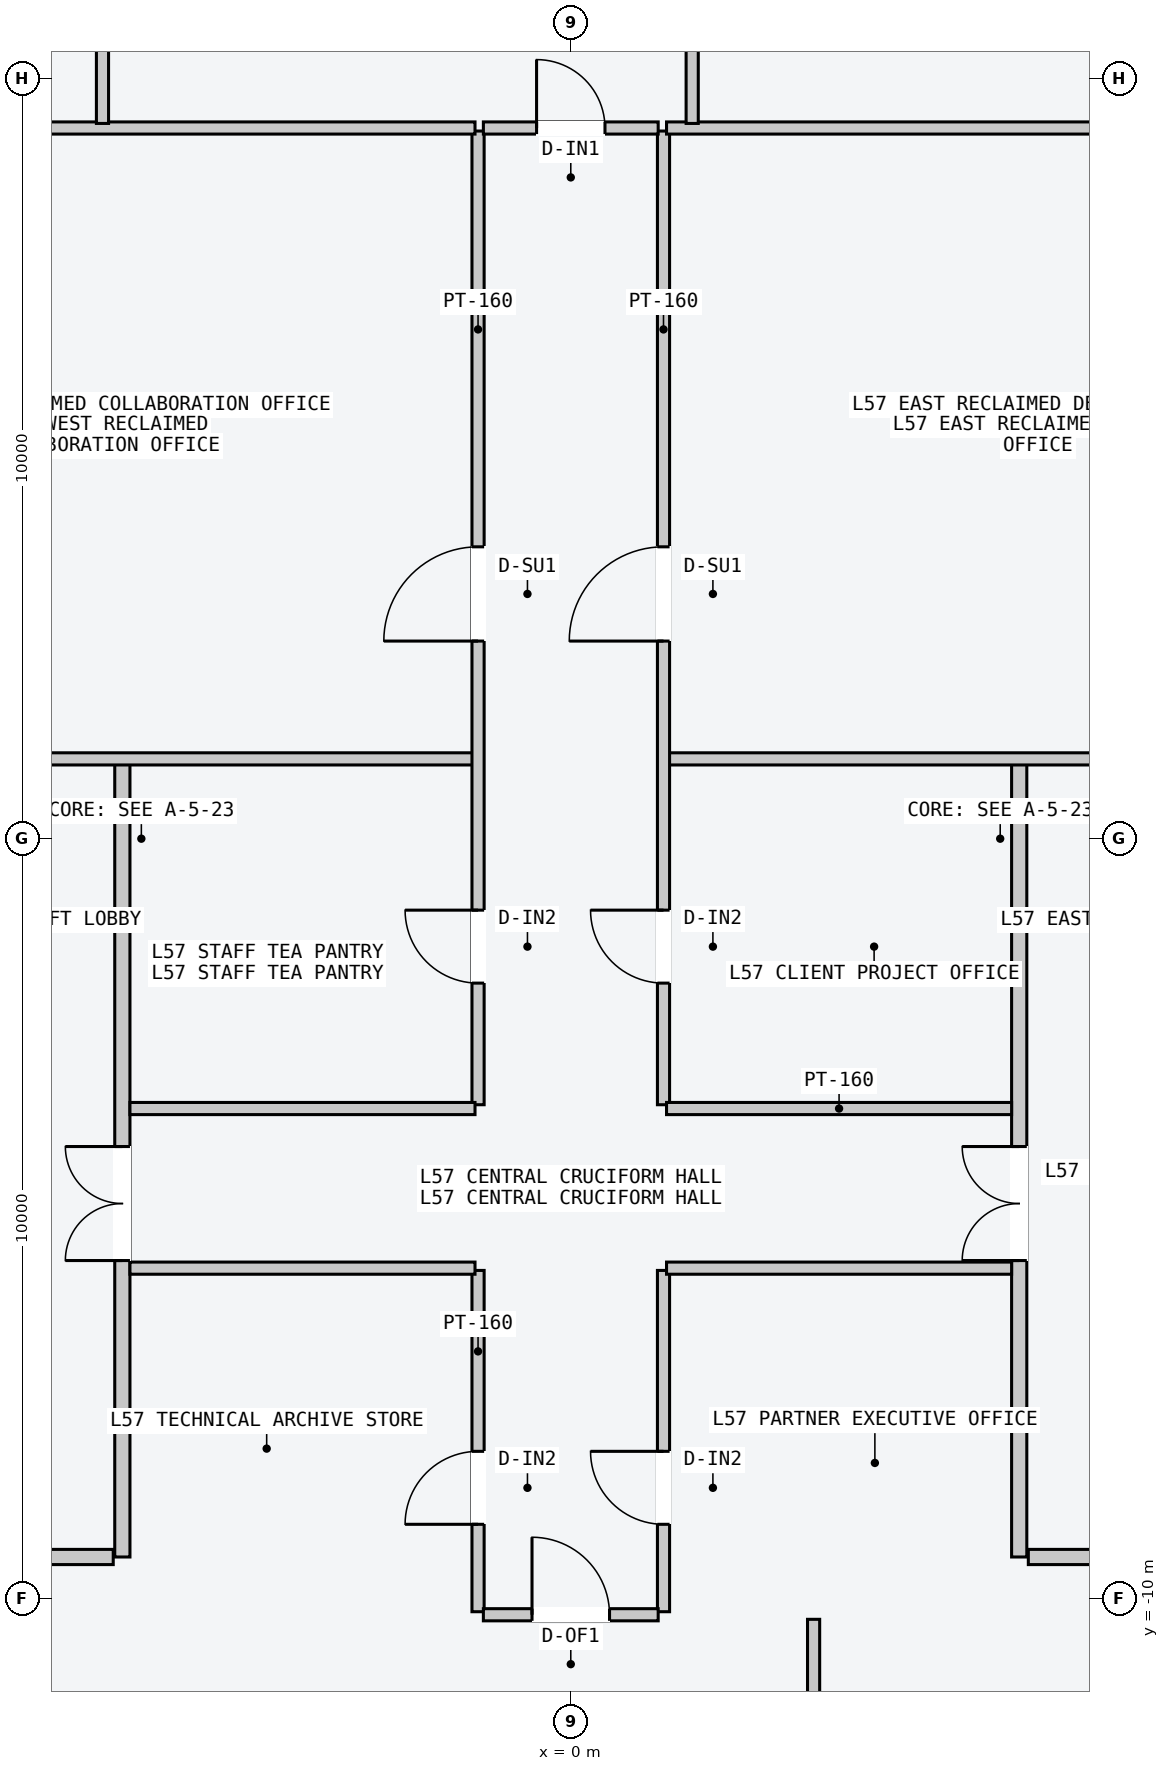
"""IFC4 building model, lengths in metres.
Left out: names, types, materials, properties, quantities, classifications, styles, units other than length and angle.
Written with IfcOpenShell. Run it as: python <this file> out.ifc"""

import sys

from ifc_helpers import new_model, si_unit, direction, frame, frame_2d, origin, place, context, subcontext, project, spatial, rectangle, extrude, element, fill, save


model = new_model("IFC4")
c1 = context("Model", 3, precision=1e-05, world=origin(), true_north=direction((0.0, 1.0)))
c2 = subcontext(c1, "Body", "Model", "MODEL_VIEW")
j1 = project(units=[si_unit("LENGTHUNIT", "METRE"), si_unit("PLANEANGLEUNIT", "RADIAN")], contexts=[c1])
p1 = place(None, origin())
s1 = spatial("IfcSite", under=j1, at=p1, CompositionType="ELEMENT")
p2 = place(p1, origin())
s2 = spatial("IfcBuilding", under=s1, at=p2, CompositionType="ELEMENT")
p3 = place(p2, frame((0.0, 0.0, 218.4)))
s3 = spatial("IfcBuildingStorey", under=s2, at=p3, CompositionType="ELEMENT", Elevation=218.4)
p4 = place(p3, frame((-5.9, -9.45, 0.0), z_axis=(0.0, 0.0, 1.0), x_axis=(0.0, 1.0, 0.0)))
e1 = element("IfcWall", 1, at=p4, inside=s3, PredefinedType="PARTITIONING", context=c2, shape_type="SweptSolid", body=[
    extrude(rectangle(XDim=10.5, YDim=0.2, at=frame_2d((5.25, 0.0))), origin(), (0.0, 0.0, 1.0), 3.4),
])
p5 = place(p4, frame((3.9, 0.0, 0.0)))
e2 = element("IfcOpeningElement", 2, at=p5, cuts=e1, PredefinedType="OPENING", context=c2, shape_type="SweptSolid", body=[
    extrude(rectangle(XDim=1.5, YDim=2.2, at=frame_2d((0.75, 1.1))), frame((0.0, 0.11, 0.0), z_axis=(0.0, -1.0, 0.0), x_axis=(1.0, 0.0, 0.0)), (0.0, 0.0, 1.0), 0.22),
])
p6 = place(p3, frame((-6.02, -9.45, 0.0), z_axis=(0.0, 0.0, 1.0), x_axis=(-1.0, 0.0, 0.0)))
e3 = element("IfcWall", 3, at=p6, inside=s3, PredefinedType="PARTITIONING", context=c2, shape_type="SweptSolid", body=[
    extrude(rectangle(XDim=1.8, YDim=0.2, at=frame_2d((0.9, 0.0))), origin(), (0.0, 0.0, 1.0), 3.4),
])
p7 = place(p3, frame((5.9, -9.45, 0.0), z_axis=(0.0, 0.0, 1.0), x_axis=(0.0, 1.0, 0.0)))
e4 = element("IfcWall", 4, at=p7, inside=s3, PredefinedType="PARTITIONING", context=c2, shape_type="SweptSolid", body=[
    extrude(rectangle(XDim=10.5, YDim=0.2, at=frame_2d((5.25, 0.0))), origin(), (0.0, 0.0, 1.0), 3.4),
])
p8 = place(p7, frame((3.9, 0.0, 0.0)))
e5 = element("IfcOpeningElement", 5, at=p8, cuts=e4, PredefinedType="OPENING", context=c2, shape_type="SweptSolid", body=[
    extrude(rectangle(XDim=1.5, YDim=2.2, at=frame_2d((0.75, 1.1))), frame((0.0, 0.11, 0.0), z_axis=(0.0, -1.0, 0.0), x_axis=(1.0, 0.0, 0.0)), (0.0, 0.0, 1.0), 0.22),
])
p9 = place(p3, frame((6.02, -9.45, 0.0), z_axis=(0.0, 0.0, 1.0), x_axis=(1.0, 0.0, 0.0)))
e6 = element("IfcWall", 6, at=p9, inside=s3, PredefinedType="PARTITIONING", context=c2, shape_type="SweptSolid", body=[
    extrude(rectangle(XDim=1.8, YDim=0.2, at=frame_2d((0.9, 0.0))), origin(), (0.0, 0.0, 1.0), 3.4),
])
p10 = place(p3, frame((-10.05, 1.05, 0.0), z_axis=(0.0, 0.0, 1.0), x_axis=(1.0, 0.0, 0.0)))
e7 = element("IfcWall", 7, at=p10, inside=s3, PredefinedType="PARTITIONING", context=c2, shape_type="SweptSolid", body=[
    extrude(rectangle(XDim=8.79, YDim=0.16, at=frame_2d((4.395, 0.0))), origin(), (0.0, 0.0, 1.0), 3.4),
])
p11 = place(p3, frame((-1.22, -3.5, 0.0), z_axis=(0.0, 0.0, 1.0), x_axis=(0.0, 1.0, 0.0)))
e8 = element("IfcWall", 8, at=p11, inside=s3, PredefinedType="PARTITIONING", context=c2, shape_type="SweptSolid", body=[
    extrude(rectangle(XDim=12.81, YDim=0.16, at=frame_2d((6.405, 0.0))), origin(), (0.0, 0.0, 1.0), 3.4),
])
p12 = place(p11, frame((6.1, 0.0, 0.0)))
e9 = element("IfcOpeningElement", 9, at=p12, cuts=e8, PredefinedType="OPENING", context=c2, shape_type="SweptSolid", body=[
    extrude(rectangle(XDim=1.24, YDim=2.24, at=frame_2d((0.62, 1.12))), frame((0.0, 0.09, 0.0), z_axis=(0.0, -1.0, 0.0), x_axis=(1.0, 0.0, 0.0)), (0.0, 0.0, 1.0), 0.18),
])
p13 = place(p11, frame((1.6, 0.0, 0.0)))
e10 = element("IfcOpeningElement", 10, at=p13, cuts=e8, PredefinedType="OPENING", context=c2, shape_type="SweptSolid", body=[
    extrude(rectangle(XDim=0.96, YDim=2.18, at=frame_2d((0.48, 1.09))), frame((0.0, 0.09, 0.0), z_axis=(0.0, -1.0, 0.0), x_axis=(1.0, 0.0, 0.0)), (0.0, 0.0, 1.0), 0.18),
])
p14 = place(p3, frame((-7.5, 9.35, 0.0), z_axis=(0.0, 0.0, 1.0), x_axis=(1.0, 0.0, 0.0)))
e11 = element("IfcWall", 11, at=p14, inside=s3, PredefinedType="PARTITIONING", context=c2, shape_type="SweptSolid", body=[
    extrude(rectangle(XDim=6.24, YDim=0.16, at=frame_2d((3.12, 0.0))), origin(), (0.0, 0.0, 1.0), 3.4),
])
p15 = place(p3, frame((-5.8, -3.55, 0.0), z_axis=(0.0, 0.0, 1.0), x_axis=(1.0, 0.0, 0.0)))
e12 = element("IfcWall", 12, at=p15, inside=s3, PredefinedType="PARTITIONING", context=c2, shape_type="SweptSolid", body=[
    extrude(rectangle(XDim=4.54, YDim=0.16, at=frame_2d((2.27, 0.0))), origin(), (0.0, 0.0, 1.0), 3.4),
])
p16 = place(p3, frame((1.26, 1.05, 0.0), z_axis=(0.0, 0.0, 1.0), x_axis=(1.0, 0.0, 0.0)))
e13 = element("IfcWall", 13, at=p16, inside=s3, PredefinedType="PARTITIONING", context=c2, shape_type="SweptSolid", body=[
    extrude(rectangle(XDim=8.8, YDim=0.16, at=frame_2d((4.4, 0.0))), origin(), (0.0, 0.0, 1.0), 3.4),
])
p17 = place(p3, frame((1.22, -3.5, 0.0), z_axis=(0.0, 0.0, 1.0), x_axis=(0.0, 1.0, 0.0)))
e14 = element("IfcWall", 14, at=p17, inside=s3, PredefinedType="PARTITIONING", context=c2, shape_type="SweptSolid", body=[
    extrude(rectangle(XDim=12.81, YDim=0.16, at=frame_2d((6.405, 0.0))), origin(), (0.0, 0.0, 1.0), 3.4),
])
p18 = place(p17, frame((6.1, 0.0, 0.0)))
e15 = element("IfcOpeningElement", 15, at=p18, cuts=e14, PredefinedType="OPENING", context=c2, shape_type="SweptSolid", body=[
    extrude(rectangle(XDim=1.24, YDim=2.24, at=frame_2d((0.62, 1.12))), frame((0.0, 0.09, 0.0), z_axis=(0.0, -1.0, 0.0), x_axis=(1.0, 0.0, 0.0)), (0.0, 0.0, 1.0), 0.18),
])
p19 = place(p17, frame((1.6, 0.0, 0.0)))
e16 = element("IfcOpeningElement", 16, at=p19, cuts=e14, PredefinedType="OPENING", context=c2, shape_type="SweptSolid", body=[
    extrude(rectangle(XDim=0.96, YDim=2.18, at=frame_2d((0.48, 1.09))), frame((0.0, 0.09, 0.0), z_axis=(0.0, -1.0, 0.0), x_axis=(1.0, 0.0, 0.0)), (0.0, 0.0, 1.0), 0.18),
])
p20 = place(p3, frame((1.26, 9.35, 0.0), z_axis=(0.0, 0.0, 1.0), x_axis=(1.0, 0.0, 0.0)))
e17 = element("IfcWall", 17, at=p20, inside=s3, PredefinedType="PARTITIONING", context=c2, shape_type="SweptSolid", body=[
    extrude(rectangle(XDim=6.24, YDim=0.16, at=frame_2d((3.12, 0.0))), origin(), (0.0, 0.0, 1.0), 3.4),
])
p21 = place(p3, frame((1.26, -3.55, 0.0), z_axis=(0.0, 0.0, 1.0), x_axis=(1.0, 0.0, 0.0)))
e18 = element("IfcWall", 18, at=p21, inside=s3, PredefinedType="PARTITIONING", context=c2, shape_type="SweptSolid", body=[
    extrude(rectangle(XDim=4.54, YDim=0.16, at=frame_2d((2.27, 0.0))), origin(), (0.0, 0.0, 1.0), 3.4),
])
p22 = place(p3, frame((-1.22, -10.17, 0.0), z_axis=(0.0, 0.0, 1.0), x_axis=(0.0, 1.0, 0.0)))
e19 = element("IfcWall", 19, at=p22, inside=s3, PredefinedType="PARTITIONING", context=c2, shape_type="SweptSolid", body=[
    extrude(rectangle(XDim=4.49, YDim=0.16, at=frame_2d((2.245, 0.0))), origin(), (0.0, 0.0, 1.0), 3.4),
])
p23 = place(p22, frame((1.15, 0.0, 0.0)))
e20 = element("IfcOpeningElement", 20, at=p23, cuts=e19, PredefinedType="OPENING", context=c2, shape_type="SweptSolid", body=[
    extrude(rectangle(XDim=0.96, YDim=2.18, at=frame_2d((0.48, 1.09))), frame((0.0, 0.09, 0.0), z_axis=(0.0, -1.0, 0.0), x_axis=(1.0, 0.0, 0.0)), (0.0, 0.0, 1.0), 0.18),
])
p24 = place(p3, frame((1.22, -10.17, 0.0), z_axis=(0.0, 0.0, 1.0), x_axis=(0.0, 1.0, 0.0)))
e21 = element("IfcWall", 21, at=p24, inside=s3, PredefinedType="PARTITIONING", context=c2, shape_type="SweptSolid", body=[
    extrude(rectangle(XDim=4.49, YDim=0.16, at=frame_2d((2.245, 0.0))), origin(), (0.0, 0.0, 1.0), 3.4),
])
p25 = place(p24, frame((1.15, 0.0, 0.0)))
e22 = element("IfcOpeningElement", 22, at=p25, cuts=e21, PredefinedType="OPENING", context=c2, shape_type="SweptSolid", body=[
    extrude(rectangle(XDim=0.96, YDim=2.18, at=frame_2d((0.48, 1.09))), frame((0.0, 0.09, 0.0), z_axis=(0.0, -1.0, 0.0), x_axis=(1.0, 0.0, 0.0)), (0.0, 0.0, 1.0), 0.18),
])
for number, where, z_axis, x_axis in (
    (23, (-5.8, -5.65, 0.0), (0.0, 0.0, 1.0), (1.0, 0.0, 0.0)),
    (24, (1.26, -5.65, 0.0), (0.0, 0.0, 1.0), (1.0, 0.0, 0.0)),
):
    element("IfcWall", number, at=place(p3, frame(where, z_axis=z_axis, x_axis=x_axis)), inside=s3, PredefinedType="PARTITIONING", context=c2, shape_type="SweptSolid", body=[
        extrude(rectangle(XDim=4.54, YDim=0.16, at=frame_2d((2.27, 0.0))), origin(), (0.0, 0.0, 1.0), 3.4),
    ])
p26 = place(p3, frame((-6.161, 9.41, 0.0), z_axis=(0.0, 0.0, 1.0), x_axis=(0.0, 1.0, 0.0)))
e25 = element("IfcWall", 25, at=p26, inside=s3, PredefinedType="PARTITIONING", context=c2, shape_type="SweptSolid", body=[
    extrude(rectangle(XDim=8.15, YDim=0.16, at=frame_2d((4.075, 0.0))), origin(), (0.0, 0.0, 1.0), 3.4),
])
p27 = place(p26, frame((1.15, 0.0, 0.0)))
e26 = element("IfcOpeningElement", 26, at=p27, cuts=e25, PredefinedType="OPENING", context=c2, shape_type="SweptSolid", body=[
    extrude(rectangle(XDim=0.96, YDim=2.18, at=frame_2d((0.48, 1.09))), frame((0.0, 0.09, 0.0), z_axis=(0.0, -1.0, 0.0), x_axis=(1.0, 0.0, 0.0)), (0.0, 0.0, 1.0), 0.18),
])
p28 = place(p3, frame((1.597, 9.41, 0.0), z_axis=(0.0, 0.0, 1.0), x_axis=(0.0, 1.0, 0.0)))
e27 = element("IfcWall", 27, at=p28, inside=s3, PredefinedType="PARTITIONING", context=c2, shape_type="SweptSolid", body=[
    extrude(rectangle(XDim=8.15, YDim=0.16, at=frame_2d((4.075, 0.0))), origin(), (0.0, 0.0, 1.0), 3.4),
])
p29 = place(p28, frame((1.15, 0.0, 0.0)))
e28 = element("IfcOpeningElement", 28, at=p29, cuts=e27, PredefinedType="OPENING", context=c2, shape_type="SweptSolid", body=[
    extrude(rectangle(XDim=0.96, YDim=2.18, at=frame_2d((0.48, 1.09))), frame((0.0, 0.09, 0.0), z_axis=(0.0, -1.0, 0.0), x_axis=(1.0, 0.0, 0.0)), (0.0, 0.0, 1.0), 0.18),
])
p30 = place(p3, frame((-1.15, 9.35, 0.0), z_axis=(0.0, 0.0, 1.0), x_axis=(1.0, 0.0, 0.0)))
e29 = element("IfcWall", 29, at=p30, inside=s3, PredefinedType="PARTITIONING", context=c2, shape_type="SweptSolid", body=[
    extrude(rectangle(XDim=2.3, YDim=0.16, at=frame_2d((1.15, 0.0))), origin(), (0.0, 0.0, 1.0), 3.4),
])
p31 = place(p30, frame((0.7, 0.0, 0.0)))
e30 = element("IfcOpeningElement", 30, at=p31, cuts=e29, PredefinedType="OPENING", context=c2, shape_type="SweptSolid", body=[
    extrude(rectangle(XDim=0.9, YDim=2.15, at=frame_2d((0.45, 1.075))), frame((0.0, 0.09, 0.0), z_axis=(0.0, -1.0, 0.0), x_axis=(1.0, 0.0, 0.0)), (0.0, 0.0, 1.0), 0.18),
])
p32 = place(p3, frame((3.195, -17.56, 0.0), z_axis=(0.0, 0.0, 1.0), x_axis=(0.0, 1.0, 0.0)))
e31 = element("IfcWall", 31, at=p32, inside=s3, PredefinedType="PARTITIONING", context=c2, shape_type="SweptSolid", body=[
    extrude(rectangle(XDim=7.29, YDim=0.16, at=frame_2d((3.645, 0.0))), origin(), (0.0, 0.0, 1.0), 3.4),
])
p33 = place(p32, frame((1.05, 0.0, 0.0)))
e32 = element("IfcOpeningElement", 32, at=p33, cuts=e31, PredefinedType="OPENING", context=c2, shape_type="SweptSolid", body=[
    extrude(rectangle(XDim=0.96, YDim=2.18, at=frame_2d((0.48, 1.09))), frame((0.0, 0.09, 0.0), z_axis=(0.0, -1.0, 0.0), x_axis=(1.0, 0.0, 0.0)), (0.0, 0.0, 1.0), 0.18),
])
p34 = place(p3, frame((-1.15, -10.21, 0.0), z_axis=(0.0, 0.0, 1.0), x_axis=(1.0, 0.0, 0.0)))
e33 = element("IfcWall", 33, at=p34, inside=s3, PredefinedType="PARTITIONING", context=c2, shape_type="SweptSolid", body=[
    extrude(rectangle(XDim=2.3, YDim=0.16, at=frame_2d((1.15, 0.0))), origin(), (0.0, 0.0, 1.0), 3.4),
])
p35 = place(p34, frame((0.64, 0.0, 0.0)))
e34 = element("IfcOpeningElement", 34, at=p35, cuts=e33, PredefinedType="OPENING", context=c2, shape_type="SweptSolid", body=[
    extrude(rectangle(XDim=1.02, YDim=2.2, at=frame_2d((0.51, 1.1))), frame((0.0, 0.09, 0.0), z_axis=(0.0, -1.0, 0.0), x_axis=(1.0, 0.0, 0.0)), (0.0, 0.0, 1.0), 0.18),
])
p36 = place(p5, origin())
e35 = element("IfcDoor", 35, at=p36, inside=s3, OperationType="DOUBLE_DOOR_SINGLE_SWING", PredefinedType="DOOR", context=c2, shape_type="SweptSolid", body=[
    extrude(rectangle(XDim=1.5, YDim=2.2, at=frame_2d((0.75, 1.1))), frame((0.0, 0.025, 0.0), z_axis=(0.0, -1.0, 0.0), x_axis=(1.0, 0.0, 0.0)), (0.0, 0.0, 1.0), 0.05),
])
fill(e2, e35)
p37 = place(p8, origin())
e36 = element("IfcDoor", 36, at=p37, inside=s3, OperationType="DOUBLE_DOOR_SINGLE_SWING", PredefinedType="DOOR", context=c2, shape_type="SweptSolid", body=[
    extrude(rectangle(XDim=1.5, YDim=2.2, at=frame_2d((0.75, 1.1))), frame((0.0, 0.025, 0.0), z_axis=(0.0, -1.0, 0.0), x_axis=(1.0, 0.0, 0.0)), (0.0, 0.0, 1.0), 0.05),
])
fill(e5, e36)
p38 = place(p12, origin())
e37 = element("IfcDoor", 37, at=p38, inside=s3, OperationType="SINGLE_SWING_LEFT", PredefinedType="DOOR", context=c2, shape_type="SweptSolid", body=[
    extrude(rectangle(XDim=1.24, YDim=2.24, at=frame_2d((0.62, 1.12))), frame((0.0, 0.025, 0.0), z_axis=(0.0, -1.0, 0.0), x_axis=(1.0, 0.0, 0.0)), (0.0, 0.0, 1.0), 0.05),
])
fill(e9, e37)
p39 = place(p13, origin())
e38 = element("IfcDoor", 38, at=p39, inside=s3, OperationType="SINGLE_SWING_RIGHT", PredefinedType="DOOR", context=c2, shape_type="SweptSolid", body=[
    extrude(rectangle(XDim=0.96, YDim=2.18, at=frame_2d((0.48, 1.09))), frame((0.0, 0.025, 0.0), z_axis=(0.0, -1.0, 0.0), x_axis=(1.0, 0.0, 0.0)), (0.0, 0.0, 1.0), 0.05),
])
fill(e10, e38)
p40 = place(p18, origin())
e39 = element("IfcDoor", 39, at=p40, inside=s3, OperationType="SINGLE_SWING_LEFT", PredefinedType="DOOR", context=c2, shape_type="SweptSolid", body=[
    extrude(rectangle(XDim=1.24, YDim=2.24, at=frame_2d((0.62, 1.12))), frame((0.0, 0.025, 0.0), z_axis=(0.0, -1.0, 0.0), x_axis=(1.0, 0.0, 0.0)), (0.0, 0.0, 1.0), 0.05),
])
fill(e15, e39)
p41 = place(p19, origin())
e40 = element("IfcDoor", 40, at=p41, inside=s3, OperationType="SINGLE_SWING_RIGHT", PredefinedType="DOOR", context=c2, shape_type="SweptSolid", body=[
    extrude(rectangle(XDim=0.96, YDim=2.18, at=frame_2d((0.48, 1.09))), frame((0.0, 0.025, 0.0), z_axis=(0.0, -1.0, 0.0), x_axis=(1.0, 0.0, 0.0)), (0.0, 0.0, 1.0), 0.05),
])
fill(e16, e40)
p42 = place(p23, origin())
e41 = element("IfcDoor", 41, at=p42, inside=s3, OperationType="SINGLE_SWING_LEFT", PredefinedType="DOOR", context=c2, shape_type="SweptSolid", body=[
    extrude(rectangle(XDim=0.96, YDim=2.18, at=frame_2d((0.48, 1.09))), frame((0.0, 0.025, 0.0), z_axis=(0.0, -1.0, 0.0), x_axis=(1.0, 0.0, 0.0)), (0.0, 0.0, 1.0), 0.05),
])
fill(e20, e41)
p43 = place(p25, origin())
e42 = element("IfcDoor", 42, at=p43, inside=s3, OperationType="SINGLE_SWING_RIGHT", PredefinedType="DOOR", context=c2, shape_type="SweptSolid", body=[
    extrude(rectangle(XDim=0.96, YDim=2.18, at=frame_2d((0.48, 1.09))), frame((0.0, 0.025, 0.0), z_axis=(0.0, -1.0, 0.0), x_axis=(1.0, 0.0, 0.0)), (0.0, 0.0, 1.0), 0.05),
])
fill(e22, e42)
p44 = place(p31, origin())
e43 = element("IfcDoor", 43, at=p44, inside=s3, OperationType="SINGLE_SWING_LEFT", PredefinedType="DOOR", context=c2, shape_type="SweptSolid", body=[
    extrude(rectangle(XDim=0.9, YDim=2.15, at=frame_2d((0.45, 1.075))), frame((0.0, 0.025, 0.0), z_axis=(0.0, -1.0, 0.0), x_axis=(1.0, 0.0, 0.0)), (0.0, 0.0, 1.0), 0.05),
])
fill(e30, e43)
p45 = place(p35, origin())
e44 = element("IfcDoor", 44, at=p45, inside=s3, OperationType="SINGLE_SWING_LEFT", PredefinedType="DOOR", context=c2, shape_type="SweptSolid", body=[
    extrude(rectangle(XDim=1.02, YDim=2.2, at=frame_2d((0.51, 1.1))), frame((0.0, 0.025, 0.0), z_axis=(0.0, -1.0, 0.0), x_axis=(1.0, 0.0, 0.0)), (0.0, 0.0, 1.0), 0.05),
])
fill(e34, e44)
save(model, sys.argv[1])
